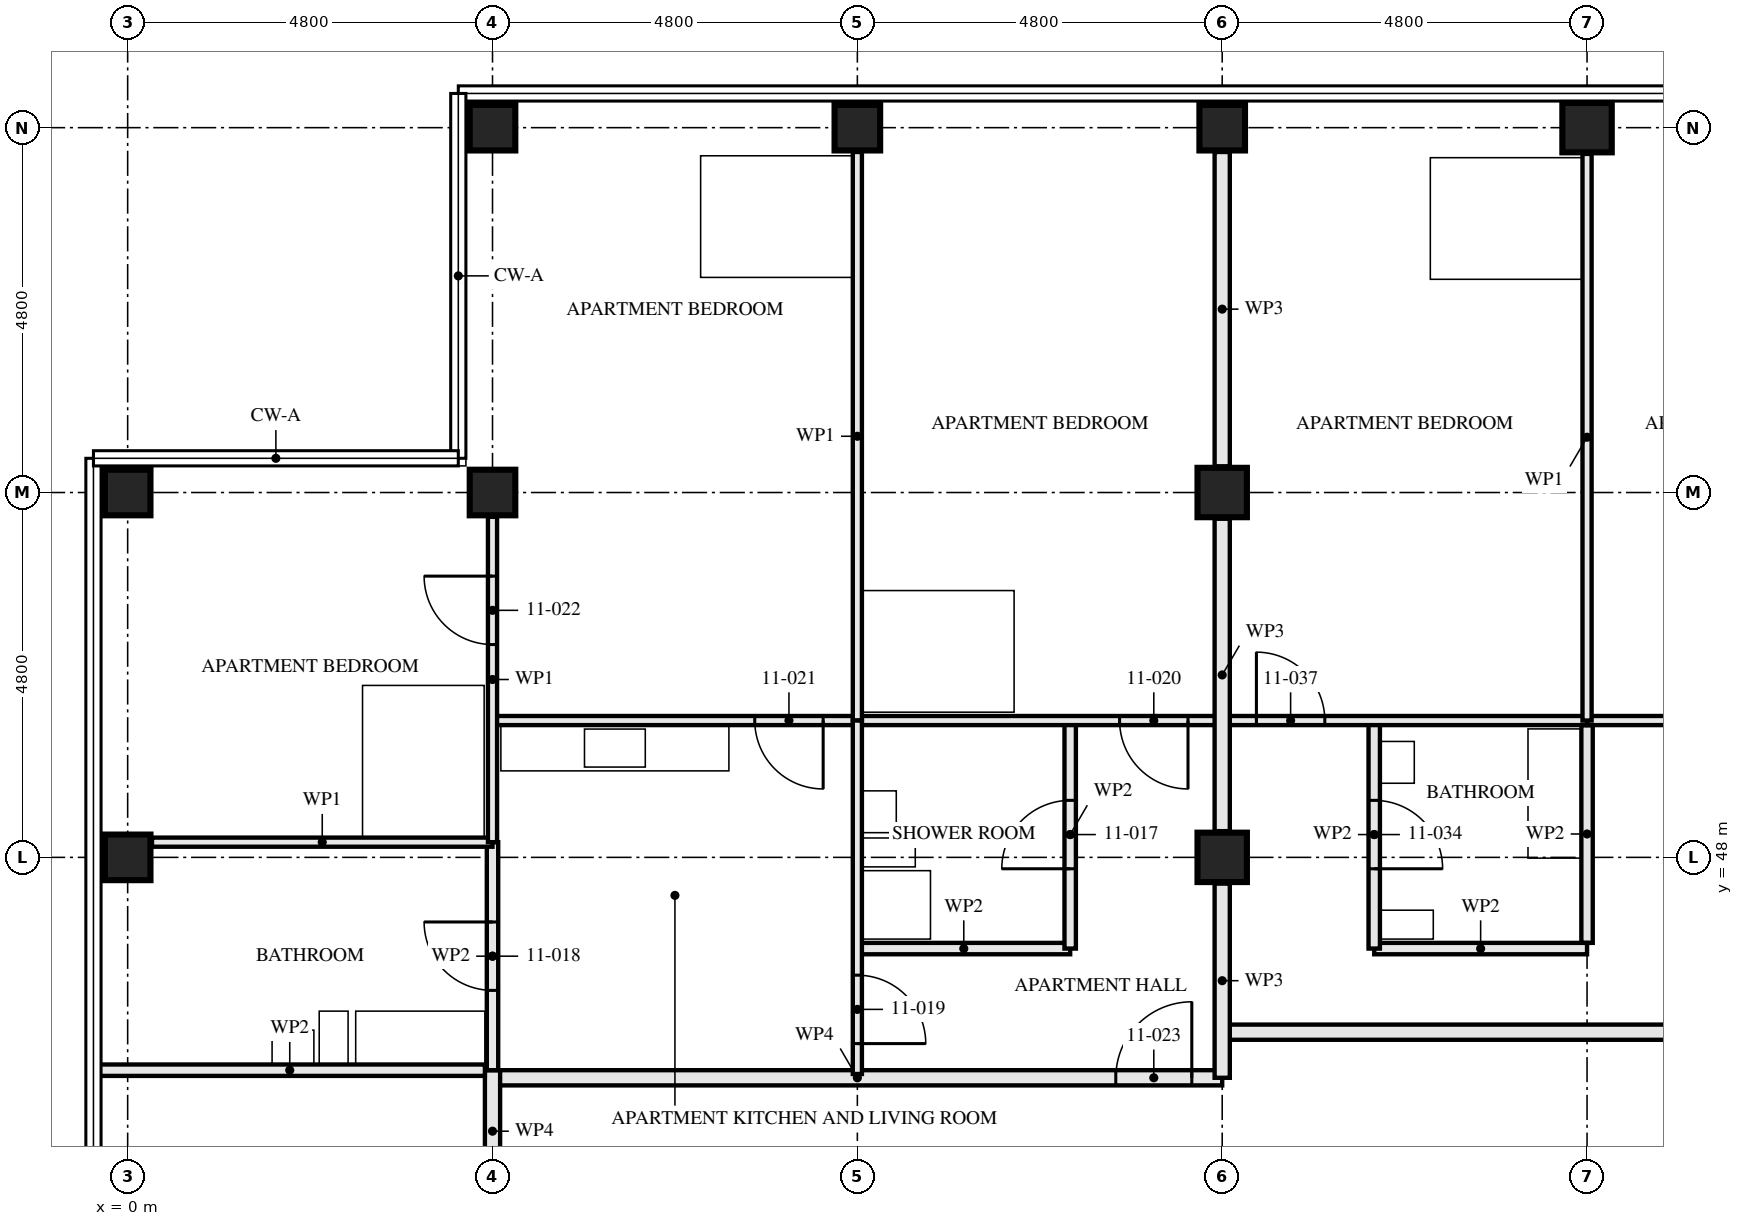
"""IFC4 building model, lengths in metres.
Left out: names, types, materials, properties, quantities, classifications, styles, units other than length and angle.
Written with IfcOpenShell. Run it as: python <this file> out.ifc"""

import sys

from ifc_helpers import new_model, si_unit, direction, frame, frame_2d, origin, origin_2d, place, context, subcontext, project, spatial, rectangle, hollow_rectangle, extrude, element, fill, save


model = new_model("IFC4")
c1 = context("Model", 3, precision=1e-05, world=origin(), true_north=direction((0.0, 1.0)))
c2 = subcontext(c1, "Body", "Model", "MODEL_VIEW")
j1 = project(units=[si_unit("LENGTHUNIT", "METRE"), si_unit("PLANEANGLEUNIT", "RADIAN")], contexts=[c1])
p1 = place(None, origin())
s1 = spatial("IfcSite", under=j1, at=p1, CompositionType="ELEMENT")
p2 = place(p1, origin())
s2 = spatial("IfcBuilding", under=s1, at=p2, CompositionType="ELEMENT")
p3 = place(p2, frame((0.0, 0.0, 44.5)))
s3 = spatial("IfcBuildingStorey", under=s2, at=p3, CompositionType="ELEMENT", Elevation=44.5)
p4 = place(p3, frame((0.0, 48.0, 0.0), z_axis=(0.0, 0.0, 1.0), x_axis=(1.0, 0.0, 0.0)))
e1 = element("IfcColumn", 1, at=p4, inside=s3, PredefinedType="COLUMN", context=c2, shape_type="SweptSolid", body=[
    extrude(hollow_rectangle(XDim=0.6, YDim=0.6, WallThickness=0.08, at=origin_2d()), origin(), (0.0, 0.0, 1.0), 3.5),
])
for number, where, z_axis, x_axis in (
    (2, (0.0, 52.8, 0.0), (0.0, 0.0, 1.0), (0.0, 1.0, 0.0)),
    (3, (4.8, 52.8, 0.0), (0.0, 0.0, 1.0), (0.0, 1.0, 0.0)),
    (4, (4.8, 57.6, 0.0), (0.0, 0.0, 1.0), (0.0, 1.0, 0.0)),
):
    element("IfcColumn", number, at=place(p3, frame(where, z_axis=z_axis, x_axis=x_axis)), inside=s3, PredefinedType="COLUMN", context=c2, shape_type="SweptSolid", body=[
        extrude(hollow_rectangle(XDim=0.6, YDim=0.6, WallThickness=0.06, at=origin_2d()), origin(), (0.0, 0.0, 1.0), 3.5),
    ])
p5 = place(p3, frame((9.6, 57.6, 0.0), z_axis=(0.0, 0.0, 1.0), x_axis=(0.0, 1.0, 0.0)))
e5 = element("IfcColumn", 5, at=p5, inside=s3, PredefinedType="COLUMN", context=c2, shape_type="SweptSolid", body=[
    extrude(hollow_rectangle(XDim=0.6, YDim=0.6, WallThickness=0.08, at=origin_2d()), origin(), (0.0, 0.0, 1.0), 3.5),
])
for number, where, z_axis, x_axis in (
    (6, (14.4, 48.0, 0.0), (0.0, 0.0, 1.0), (1.0, 0.0, 0.0)),
    (7, (14.4, 52.8, 0.0), (0.0, 0.0, 1.0), (1.0, 0.0, 0.0)),
):
    element("IfcColumn", number, at=place(p3, frame(where, z_axis=z_axis, x_axis=x_axis)), inside=s3, PredefinedType="COLUMN", context=c2, shape_type="SweptSolid", body=[
        extrude(hollow_rectangle(XDim=0.65, YDim=0.65, WallThickness=0.05, at=origin_2d()), origin(), (0.0, 0.0, 1.0), 3.5),
    ])
p6 = place(p3, frame((14.4, 57.6, 0.0), z_axis=(0.0, 0.0, 1.0), x_axis=(0.0, 1.0, 0.0)))
e8 = element("IfcColumn", 8, at=p6, inside=s3, PredefinedType="COLUMN", context=c2, shape_type="SweptSolid", body=[
    extrude(hollow_rectangle(XDim=0.6, YDim=0.6, WallThickness=0.08, at=origin_2d()), origin(), (0.0, 0.0, 1.0), 3.5),
])
p7 = place(p3, frame((19.2, 57.6, 0.0), z_axis=(0.0, 0.0, 1.0), x_axis=(0.0, 1.0, 0.0)))
e9 = element("IfcColumn", 9, at=p7, inside=s3, PredefinedType="COLUMN", context=c2, shape_type="SweptSolid", body=[
    extrude(hollow_rectangle(XDim=0.65, YDim=0.65, WallThickness=0.08, at=origin_2d()), origin(), (0.0, 0.0, 1.0), 3.5),
])
p8 = place(p3, frame((12.4, 49.8, 0.0), z_axis=(0.0, 0.0, 1.0), x_axis=(0.0, -1.0, 0.0)))
e10 = element("IfcWall", 10, at=p8, inside=s3, PredefinedType="PARTITIONING", context=c2, shape_type="SweptSolid", body=[
    extrude(rectangle(XDim=3.0, YDim=0.15, at=frame_2d((1.5, 0.0))), origin(), (0.0, 0.0, 1.0), 2.55),
])
p9 = place(p8, frame((1.05, 0.0, 0.0)))
e11 = element("IfcOpeningElement", 11, at=p9, cuts=e10, PredefinedType="OPENING", context=c2, shape_type="SweptSolid", body=[
    extrude(rectangle(XDim=0.9, YDim=2.1, at=frame_2d((0.45, 1.05))), frame((0.0, 0.085, 0.0), z_axis=(0.0, -1.0, 0.0), x_axis=(1.0, 0.0, 0.0)), (0.0, 0.0, 1.0), 0.171),
])
p10 = place(p3, frame((12.4, 46.8, 0.0), z_axis=(0.0, 0.0, 1.0), x_axis=(-1.0, 0.0, 0.0)))
e12 = element("IfcWall", 12, at=p10, inside=s3, PredefinedType="PARTITIONING", context=c2, shape_type="SweptSolid", body=[
    extrude(rectangle(XDim=2.8, YDim=0.15, at=frame_2d((1.4, 0.0))), origin(), (0.0, 0.0, 1.0), 3.33),
])
p11 = place(p3, frame((4.8, 48.2, 0.0), z_axis=(0.0, 0.0, 1.0), x_axis=(0.0, -1.0, 0.0)))
e13 = element("IfcWall", 13, at=p11, inside=s3, PredefinedType="PARTITIONING", context=c2, shape_type="SweptSolid", body=[
    extrude(rectangle(XDim=3.0, YDim=0.15, at=frame_2d((1.5, 0.0))), origin(), (0.0, 0.0, 1.0), 2.55),
])
p12 = place(p11, frame((1.05, 0.0, 0.0)))
e14 = element("IfcOpeningElement", 14, at=p12, cuts=e13, PredefinedType="OPENING", context=c2, shape_type="SweptSolid", body=[
    extrude(rectangle(XDim=0.9, YDim=2.1, at=frame_2d((0.45, 1.05))), frame((0.0, 0.085, 0.0), z_axis=(0.0, -1.0, 0.0), x_axis=(1.0, 0.0, 0.0)), (0.0, 0.0, 1.0), 0.171),
])
p13 = place(p3, frame((9.6, 49.8, 0.0), z_axis=(0.0, 0.0, 1.0), x_axis=(0.0, -1.0, 0.0)))
e15 = element("IfcWall", 15, at=p13, inside=s3, PredefinedType="PARTITIONING", context=c2, shape_type="SweptSolid", body=[
    extrude(rectangle(XDim=4.65, YDim=0.12, at=frame_2d((2.325, 0.0))), origin(), (0.0, 0.0, 1.0), 2.55),
])
p14 = place(p13, frame((3.35, 0.0, 0.0)))
e16 = element("IfcOpeningElement", 16, at=p14, cuts=e15, PredefinedType="OPENING", context=c2, shape_type="SweptSolid", body=[
    extrude(rectangle(XDim=0.9, YDim=2.1, at=frame_2d((0.45, 1.05))), frame((0.0, 0.071, 0.0), z_axis=(0.0, -1.0, 0.0), x_axis=(1.0, 0.0, 0.0)), (0.0, 0.0, 1.0), 0.141),
])
p15 = place(p3, frame((14.4, 49.8, 0.0), z_axis=(0.0, 0.0, 1.0), x_axis=(-1.0, 0.0, 0.0)))
e17 = element("IfcWall", 17, at=p15, inside=s3, PredefinedType="PARTITIONING", context=c2, shape_type="SweptSolid", body=[
    extrude(rectangle(XDim=4.8, YDim=0.12, at=frame_2d((2.4, 0.0))), origin(), (0.0, 0.0, 1.0), 3.33),
])
p16 = place(p15, frame((0.45, 0.0, 0.0)))
e18 = element("IfcOpeningElement", 18, at=p16, cuts=e17, PredefinedType="OPENING", context=c2, shape_type="SweptSolid", body=[
    extrude(rectangle(XDim=0.9, YDim=2.1, at=frame_2d((0.45, 1.05))), frame((0.0, 0.071, 0.0), z_axis=(0.0, -1.0, 0.0), x_axis=(1.0, 0.0, 0.0)), (0.0, 0.0, 1.0), 0.141),
])
p17 = place(p3, frame((9.6, 49.8, 0.0), z_axis=(0.0, 0.0, 1.0), x_axis=(-1.0, 0.0, 0.0)))
e19 = element("IfcWall", 19, at=p17, inside=s3, PredefinedType="PARTITIONING", context=c2, shape_type="SweptSolid", body=[
    extrude(rectangle(XDim=4.8, YDim=0.12, at=frame_2d((2.4, 0.0))), origin(), (0.0, 0.0, 1.0), 3.33),
])
p18 = place(p17, frame((0.45, 0.0, 0.0)))
e20 = element("IfcOpeningElement", 20, at=p18, cuts=e19, PredefinedType="OPENING", context=c2, shape_type="SweptSolid", body=[
    extrude(rectangle(XDim=0.9, YDim=2.1, at=frame_2d((0.45, 1.05))), frame((0.0, 0.071, 0.0), z_axis=(0.0, -1.0, 0.0), x_axis=(1.0, 0.0, 0.0)), (0.0, 0.0, 1.0), 0.141),
])
p19 = place(p3, frame((4.8, 48.2, 0.0), z_axis=(0.0, 0.0, 1.0), x_axis=(-1.0, 0.0, 0.0)))
e21 = element("IfcWall", 21, at=p19, inside=s3, PredefinedType="PARTITIONING", context=c2, shape_type="SweptSolid", body=[
    extrude(rectangle(XDim=4.48, YDim=0.12, at=frame_2d((2.24, 0.0))), origin(), (0.0, 0.0, 1.0), 3.33),
])
p20 = place(p3, frame((9.6, 57.28, 0.0), z_axis=(0.0, 0.0, 1.0), x_axis=(0.0, -1.0, 0.0)))
e22 = element("IfcWall", 22, at=p20, inside=s3, PredefinedType="PARTITIONING", context=c2, shape_type="SweptSolid", body=[
    extrude(rectangle(XDim=7.48, YDim=0.12, at=frame_2d((3.74, 0.0))), origin(), (0.0, 0.0, 1.0), 2.55),
])
p21 = place(p3, frame((4.8, 52.48, 0.0), z_axis=(0.0, 0.0, 1.0), x_axis=(0.0, -1.0, 0.0)))
e23 = element("IfcWall", 23, at=p21, inside=s3, PredefinedType="PARTITIONING", context=c2, shape_type="SweptSolid", body=[
    extrude(rectangle(XDim=4.28, YDim=0.12, at=frame_2d((2.14, 0.0))), origin(), (0.0, 0.0, 1.0), 3.33),
])
p22 = place(p21, frame((0.78, 0.0, 0.0)))
e24 = element("IfcOpeningElement", 24, at=p22, cuts=e23, PredefinedType="OPENING", context=c2, shape_type="SweptSolid", body=[
    extrude(rectangle(XDim=0.9, YDim=2.1, at=frame_2d((0.45, 1.05))), frame((0.0, 0.071, 0.0), z_axis=(0.0, -1.0, 0.0), x_axis=(1.0, 0.0, 0.0)), (0.0, 0.0, 1.0), 0.141),
])
p23 = place(p3, frame((14.4, 45.1, 0.0), z_axis=(0.0, 0.0, 1.0), x_axis=(-1.0, 0.0, 0.0)))
e25 = element("IfcWall", 25, at=p23, inside=s3, PredefinedType="PARTITIONING", context=c2, shape_type="SweptSolid", body=[
    extrude(rectangle(XDim=9.6, YDim=0.2, at=frame_2d((4.8, 0.0))), origin(), (0.0, 0.0, 1.0), 3.33),
])
p24 = place(p23, frame((0.4, 0.0, 0.0)))
e26 = element("IfcOpeningElement", 26, at=p24, cuts=e25, PredefinedType="OPENING", context=c2, shape_type="SweptSolid", body=[
    extrude(rectangle(XDim=1.0, YDim=2.1, at=frame_2d((0.5, 1.05))), frame((0.0, 0.111, 0.0), z_axis=(0.0, -1.0, 0.0), x_axis=(1.0, 0.0, 0.0)), (0.0, 0.0, 1.0), 0.221),
])
p25 = place(p3, frame((4.8, 45.2, 0.0), z_axis=(0.0, 0.0, 1.0), x_axis=(0.0, -1.0, 0.0)))
e27 = element("IfcWall", 27, at=p25, inside=s3, PredefinedType="PARTITIONING", context=c2, shape_type="SweptSolid", body=[
    extrude(rectangle(XDim=1.605, YDim=0.2, at=frame_2d((0.802, 0.0))), origin(), (0.0, 0.0, 1.0), 3.33),
])
p26 = place(p3, frame((16.4, 49.8, 0.0), z_axis=(0.0, 0.0, 1.0), x_axis=(0.0, -1.0, 0.0)))
e28 = element("IfcWall", 28, at=p26, inside=s3, PredefinedType="PARTITIONING", context=c2, shape_type="SweptSolid", body=[
    extrude(rectangle(XDim=3.0, YDim=0.15, at=frame_2d((1.5, 0.0))), origin(), (0.0, 0.0, 1.0), 2.55),
])
p27 = place(p26, frame((1.05, 0.0, 0.0)))
e29 = element("IfcOpeningElement", 29, at=p27, cuts=e28, PredefinedType="OPENING", context=c2, shape_type="SweptSolid", body=[
    extrude(rectangle(XDim=0.9, YDim=2.1, at=frame_2d((0.45, 1.05))), frame((0.0, 0.085, 0.0), z_axis=(0.0, -1.0, 0.0), x_axis=(1.0, 0.0, 0.0)), (0.0, 0.0, 1.0), 0.171),
])
p28 = place(p3, frame((19.2, 46.8, 0.0), z_axis=(0.0, 0.0, 1.0), x_axis=(-1.0, 0.0, 0.0)))
e30 = element("IfcWall", 30, at=p28, inside=s3, PredefinedType="PARTITIONING", context=c2, shape_type="SweptSolid", body=[
    extrude(rectangle(XDim=2.8, YDim=0.15, at=frame_2d((1.4, 0.0))), origin(), (0.0, 0.0, 1.0), 3.33),
])
p29 = place(p3, frame((24.0, 49.8, 0.0), z_axis=(0.0, 0.0, 1.0), x_axis=(-1.0, 0.0, 0.0)))
e31 = element("IfcWall", 31, at=p29, inside=s3, PredefinedType="PARTITIONING", context=c2, shape_type="SweptSolid", body=[
    extrude(rectangle(XDim=4.8, YDim=0.12, at=frame_2d((2.4, 0.0))), origin(), (0.0, 0.0, 1.0), 3.33),
])
p30 = place(p29, frame((0.45, 0.0, 0.0)))
e32 = element("IfcOpeningElement", 32, at=p30, cuts=e31, PredefinedType="OPENING", context=c2, shape_type="SweptSolid", body=[
    extrude(rectangle(XDim=0.9, YDim=2.1, at=frame_2d((0.45, 1.05))), frame((0.0, 0.071, 0.0), z_axis=(0.0, -1.0, 0.0), x_axis=(1.0, 0.0, 0.0)), (0.0, 0.0, 1.0), 0.141),
])
p31 = place(p3, frame((19.2, 49.8, 0.0), z_axis=(0.0, 0.0, 1.0), x_axis=(-1.0, 0.0, 0.0)))
e33 = element("IfcWall", 33, at=p31, inside=s3, PredefinedType="PARTITIONING", context=c2, shape_type="SweptSolid", body=[
    extrude(rectangle(XDim=4.8, YDim=0.12, at=frame_2d((2.4, 0.0))), origin(), (0.0, 0.0, 1.0), 3.33),
])
p32 = place(p31, frame((3.45, 0.0, 0.0)))
e34 = element("IfcOpeningElement", 34, at=p32, cuts=e33, PredefinedType="OPENING", context=c2, shape_type="SweptSolid", body=[
    extrude(rectangle(XDim=0.9, YDim=2.1, at=frame_2d((0.45, 1.05))), frame((0.0, 0.071, 0.0), z_axis=(0.0, -1.0, 0.0), x_axis=(1.0, 0.0, 0.0)), (0.0, 0.0, 1.0), 0.141),
])
p33 = place(p3, frame((19.2, 57.255, 0.0), z_axis=(0.0, 0.0, 1.0), x_axis=(0.0, -1.0, 0.0)))
e35 = element("IfcWall", 35, at=p33, inside=s3, PredefinedType="PARTITIONING", context=c2, shape_type="SweptSolid", body=[
    extrude(rectangle(XDim=7.455, YDim=0.12, at=frame_2d((3.728, 0.0))), origin(), (0.0, 0.0, 1.0), 2.55),
])
p34 = place(p3, frame((28.8, 45.7, 0.0), z_axis=(0.0, 0.0, 1.0), x_axis=(-1.0, 0.0, 0.0)))
e36 = element("IfcWall", 36, at=p34, inside=s3, PredefinedType="PARTITIONING", context=c2, shape_type="SweptSolid", body=[
    extrude(rectangle(XDim=14.4, YDim=0.2, at=frame_2d((7.2, 0.0))), origin(), (0.0, 0.0, 1.0), 3.33),
])
p35 = place(p34, frame((0.4, 0.0, 0.0)))
e37 = element("IfcOpeningElement", 37, at=p35, cuts=e36, PredefinedType="OPENING", context=c2, shape_type="SweptSolid", body=[
    extrude(rectangle(XDim=1.0, YDim=2.1, at=frame_2d((0.5, 1.05))), frame((0.0, 0.111, 0.0), z_axis=(0.0, -1.0, 0.0), x_axis=(1.0, 0.0, 0.0)), (0.0, 0.0, 1.0), 0.221),
])
p36 = place(p3, frame((14.4, 45.1, 0.0), z_axis=(0.0, 0.0, 1.0), x_axis=(0.0, 1.0, 0.0)))
e38 = element("IfcWall", 38, at=p36, inside=s3, PredefinedType="PARTITIONING", context=c2, shape_type="SweptSolid", body=[
    extrude(rectangle(XDim=2.555, YDim=0.2, at=frame_2d((1.277, 0.0))), origin(), (0.0, 0.0, 1.0), 2.32),
])
p37 = place(p3, frame((14.4, 48.345, 0.0), z_axis=(0.0, 0.0, 1.0), x_axis=(0.0, 1.0, 0.0)))
e39 = element("IfcWall", 39, at=p37, inside=s3, PredefinedType="PARTITIONING", context=c2, shape_type="SweptSolid", body=[
    extrude(rectangle(XDim=4.11, YDim=0.2, at=frame_2d((2.055, 0.0))), origin(), (0.0, 0.0, 1.0), 2.32),
])
p38 = place(p3, frame((14.4, 53.145, 0.0), z_axis=(0.0, 0.0, 1.0), x_axis=(0.0, 1.0, 0.0)))
e40 = element("IfcWall", 40, at=p38, inside=s3, PredefinedType="PARTITIONING", context=c2, shape_type="SweptSolid", body=[
    extrude(rectangle(XDim=4.135, YDim=0.2, at=frame_2d((2.067, 0.0))), origin(), (0.0, 0.0, 1.0), 2.32),
])
p39 = place(p3, frame((4.7, 45.2, 0.0), z_axis=(0.0, 0.0, 1.0), x_axis=(-1.0, 0.0, 0.0)))
e41 = element("IfcWall", 41, at=p39, inside=s3, PredefinedType="PARTITIONING", context=c2, shape_type="SweptSolid", body=[
    extrude(rectangle(XDim=5.135, YDim=0.15, at=frame_2d((2.567, 0.0))), origin(), (0.0, 0.0, 1.0), 2.32),
])
p40 = place(p3, frame((19.2, 49.74, 0.0), z_axis=(0.0, 0.0, 1.0), x_axis=(0.0, -1.0, 0.0)))
e42 = element("IfcWall", 42, at=p40, inside=s3, PredefinedType="PARTITIONING", context=c2, shape_type="SweptSolid", body=[
    extrude(rectangle(XDim=2.865, YDim=0.15, at=frame_2d((1.433, 0.0))), origin(), (0.0, 0.0, 1.0), 2.55),
])
p41 = place(p9, frame((0.9, 0.0, 0.0), z_axis=(0.0, 0.0, 1.0), x_axis=(-1.0, 0.0, 0.0)))
e43 = element("IfcDoor", 43, at=p41, inside=s3, OperationType="SINGLE_SWING_RIGHT", PredefinedType="DOOR", context=c2, shape_type="SweptSolid", body=[
    extrude(rectangle(XDim=0.9, YDim=2.1, at=frame_2d((0.45, 1.05))), frame((0.0, 0.022, 0.0), z_axis=(0.0, -1.0, 0.0), x_axis=(1.0, 0.0, 0.0)), (0.0, 0.0, 1.0), 0.044),
])
fill(e11, e43)
p42 = place(p12, frame((0.9, 0.0, 0.0), z_axis=(0.0, 0.0, 1.0), x_axis=(-1.0, 0.0, 0.0)))
e44 = element("IfcDoor", 44, at=p42, inside=s3, OperationType="SINGLE_SWING_LEFT", PredefinedType="DOOR", context=c2, shape_type="SweptSolid", body=[
    extrude(rectangle(XDim=0.9, YDim=2.1, at=frame_2d((0.45, 1.05))), frame((0.0, 0.022, 0.0), z_axis=(0.0, -1.0, 0.0), x_axis=(1.0, 0.0, 0.0)), (0.0, 0.0, 1.0), 0.044),
])
fill(e14, e44)
p43 = place(p14, origin())
e45 = element("IfcDoor", 45, at=p43, inside=s3, OperationType="SINGLE_SWING_LEFT", PredefinedType="DOOR", context=c2, shape_type="SweptSolid", body=[
    extrude(rectangle(XDim=0.9, YDim=2.1, at=frame_2d((0.45, 1.05))), frame((0.0, 0.022, 0.0), z_axis=(0.0, -1.0, 0.0), x_axis=(1.0, 0.0, 0.0)), (0.0, 0.0, 1.0), 0.044),
])
fill(e16, e45)
p44 = place(p16, origin())
e46 = element("IfcDoor", 46, at=p44, inside=s3, OperationType="SINGLE_SWING_RIGHT", PredefinedType="DOOR", context=c2, shape_type="SweptSolid", body=[
    extrude(rectangle(XDim=0.9, YDim=2.1, at=frame_2d((0.45, 1.05))), frame((0.0, 0.022, 0.0), z_axis=(0.0, -1.0, 0.0), x_axis=(1.0, 0.0, 0.0)), (0.0, 0.0, 1.0), 0.044),
])
fill(e18, e46)
p45 = place(p18, origin())
e47 = element("IfcDoor", 47, at=p45, inside=s3, OperationType="SINGLE_SWING_RIGHT", PredefinedType="DOOR", context=c2, shape_type="SweptSolid", body=[
    extrude(rectangle(XDim=0.9, YDim=2.1, at=frame_2d((0.45, 1.05))), frame((0.0, 0.022, 0.0), z_axis=(0.0, -1.0, 0.0), x_axis=(1.0, 0.0, 0.0)), (0.0, 0.0, 1.0), 0.044),
])
fill(e20, e47)
p46 = place(p22, frame((0.9, 0.0, 0.0), z_axis=(0.0, 0.0, 1.0), x_axis=(-1.0, 0.0, 0.0)))
e48 = element("IfcDoor", 48, at=p46, inside=s3, OperationType="SINGLE_SWING_LEFT", PredefinedType="DOOR", context=c2, shape_type="SweptSolid", body=[
    extrude(rectangle(XDim=0.9, YDim=2.1, at=frame_2d((0.45, 1.05))), frame((0.0, 0.022, 0.0), z_axis=(0.0, -1.0, 0.0), x_axis=(1.0, 0.0, 0.0)), (0.0, 0.0, 1.0), 0.044),
])
fill(e24, e48)
p47 = place(p24, frame((1.0, 0.0, 0.0), z_axis=(0.0, 0.0, 1.0), x_axis=(-1.0, 0.0, 0.0)))
e49 = element("IfcDoor", 49, at=p47, inside=s3, OperationType="SINGLE_SWING_LEFT", PredefinedType="DOOR", context=c2, shape_type="SweptSolid", body=[
    extrude(rectangle(XDim=1.0, YDim=2.1, at=frame_2d((0.5, 1.05))), frame((0.0, 0.027, 0.0), z_axis=(0.0, -1.0, 0.0), x_axis=(1.0, 0.0, 0.0)), (0.0, 0.0, 1.0), 0.054),
])
fill(e26, e49)
p48 = place(p27, origin())
e50 = element("IfcDoor", 50, at=p48, inside=s3, OperationType="SINGLE_SWING_LEFT", PredefinedType="DOOR", context=c2, shape_type="SweptSolid", body=[
    extrude(rectangle(XDim=0.9, YDim=2.1, at=frame_2d((0.45, 1.05))), frame((0.0, 0.022, 0.0), z_axis=(0.0, -1.0, 0.0), x_axis=(1.0, 0.0, 0.0)), (0.0, 0.0, 1.0), 0.044),
])
fill(e29, e50)
p49 = place(p32, frame((0.9, 0.0, 0.0), z_axis=(0.0, 0.0, 1.0), x_axis=(-1.0, 0.0, 0.0)))
e51 = element("IfcDoor", 51, at=p49, inside=s3, OperationType="SINGLE_SWING_RIGHT", PredefinedType="DOOR", context=c2, shape_type="SweptSolid", body=[
    extrude(rectangle(XDim=0.9, YDim=2.1, at=frame_2d((0.45, 1.05))), frame((0.0, 0.022, 0.0), z_axis=(0.0, -1.0, 0.0), x_axis=(1.0, 0.0, 0.0)), (0.0, 0.0, 1.0), 0.044),
])
fill(e34, e51)
save(model, sys.argv[1])
